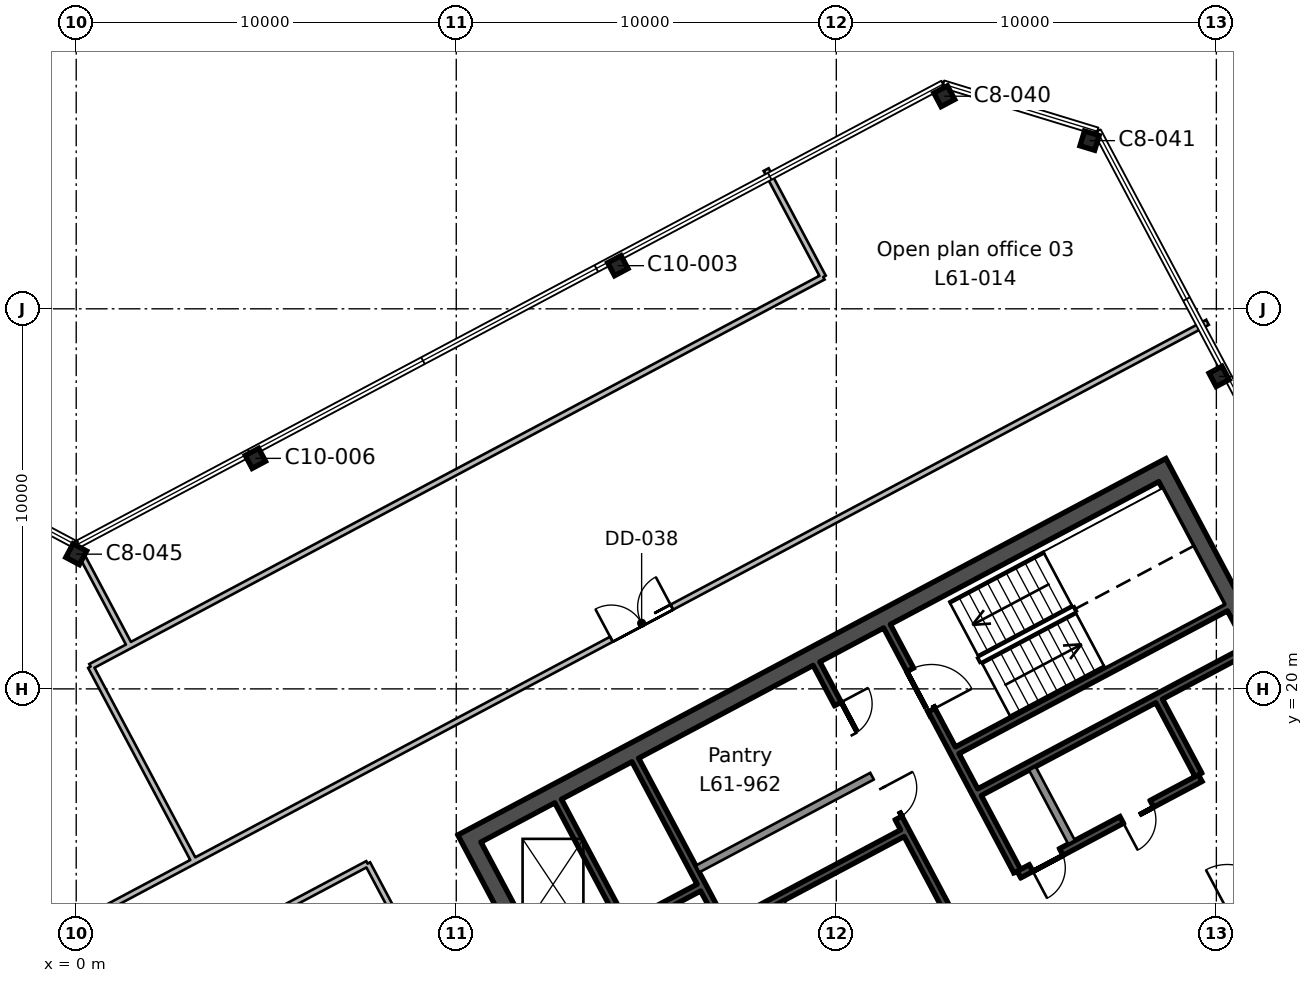
"""IFC4 building model, lengths in metres.
Left out: names, types, materials, properties, quantities, classifications, styles, units other than length and angle.
Written with IfcOpenShell. Run it as: python <this file> out.ifc"""

import sys

from ifc_helpers import new_model, si_unit, direction, frame, frame_2d, origin, origin_2d, place, context, subcontext, project, spatial, rectangle, i_section, extrude, element, fill, save


model = new_model("IFC4")
c1 = context("Model", 3, precision=1e-05, world=origin(), true_north=direction((0.0, 1.0)))
c2 = subcontext(c1, "Body", "Model", "MODEL_VIEW")
j1 = project(units=[si_unit("LENGTHUNIT", "METRE"), si_unit("PLANEANGLEUNIT", "RADIAN")], contexts=[c1])
p1 = place(None, origin())
s1 = spatial("IfcSite", under=j1, at=p1, CompositionType="ELEMENT")
p2 = place(p1, origin())
s2 = spatial("IfcBuilding", under=s1, at=p2, CompositionType="ELEMENT")
p3 = place(p2, frame((0.0, 0.0, 273.6)))
s3 = spatial("IfcBuildingStorey", under=s2, at=p3, CompositionType="ELEMENT", Elevation=273.6)
p4 = place(p3, frame((0.0, 23.544, 0.0), z_axis=(0.0, 0.0, 1.0), x_axis=(-0.882947592859, 0.469471562786, 0.0)))
e1 = element("IfcColumn", 1, at=p4, inside=s3, PredefinedType="COLUMN", context=c2, shape_type="SweptSolid", body=[
    extrude(i_section(OverallWidth=0.404, OverallDepth=0.406, WebThickness=0.027, FlangeThickness=0.044, FilletRadius=0.015, at=origin_2d()), origin(), (0.0, 0.0, 1.0), 3.9),
])
for number, where, z_axis, x_axis in (
    (2, (4.715, 26.065, 0.0), (0.0, 0.0, 1.0), (-0.883, -0.469, 0.0)),
    (3, (30.071, 28.221, 0.0), (0.0, 0.0, 1.0), (-0.469, 0.883, 0.0)),
    (4, (14.251, 31.135, 0.0), (0.0, 0.0, 1.0), (-0.883, -0.469, 0.0)),
):
    element("IfcColumn", number, at=place(p3, frame(where, z_axis=z_axis, x_axis=x_axis)), inside=s3, PredefinedType="COLUMN", context=c2, shape_type="SweptSolid", body=[
        extrude(i_section(OverallWidth=0.399, OverallDepth=0.386, WebThickness=0.021, FlangeThickness=0.033, FilletRadius=0.015, at=origin_2d()), origin(), (0.0, 0.0, 1.0), 3.9),
    ])
for number, where, z_axis, x_axis in (
    (5, (26.664, 34.425, 0.0), (0.0, 0.0, 1.0), (-0.956, 0.292, 0.0)),
    (6, (22.841, 35.594, 0.0), (0.0, 0.0, 1.0), (-0.883, -0.469, 0.0)),
):
    element("IfcColumn", number, at=place(p3, frame(where, z_axis=z_axis, x_axis=x_axis)), inside=s3, PredefinedType="COLUMN", context=c2, shape_type="SweptSolid", body=[
        extrude(i_section(OverallWidth=0.404, OverallDepth=0.406, WebThickness=0.027, FlangeThickness=0.044, FilletRadius=0.015, at=origin_2d()), origin(), (0.0, 0.0, 1.0), 3.9),
    ])
p5 = place(p3, frame((19.207, -0.604, 0.0), z_axis=(0.0, 0.0, 1.0), x_axis=(-0.469467968382, 0.882949504028, 0.0)))
e7 = element("IfcWall", 7, at=p5, inside=s3, PredefinedType="SHEAR", context=c2, shape_type="SweptSolid", body=[
    extrude(rectangle(XDim=19.1, YDim=0.45, at=frame_2d((9.55, 0.0))), origin(), (0.0, 0.0, 1.0), 3.9),
])
p6 = place(p5, frame((6.55, 0.0, 0.0)))
e8 = element("IfcOpeningElement", 8, at=p6, cuts=e7, PredefinedType="OPENING", context=c2, shape_type="SweptSolid", body=[
    extrude(rectangle(XDim=2.4, YDim=2.4, at=frame_2d((1.2, 1.2))), frame((0.0, 0.235, 0.0), z_axis=(0.0, -1.0, 0.0), x_axis=(1.0, 0.0, 0.0)), (0.0, 0.0, 1.0), 0.47),
])
p7 = place(p3, frame((37.439, 9.091, 0.0), z_axis=(0.0, 0.0, 1.0), x_axis=(-0.469467968382, 0.882949504028, 0.0)))
e9 = element("IfcWall", 9, at=p7, inside=s3, PredefinedType="SHEAR", context=c2, shape_type="SweptSolid", body=[
    extrude(rectangle(XDim=19.1, YDim=0.45, at=frame_2d((9.55, 0.0))), origin(), (0.0, 0.0, 1.0), 3.9),
])
p8 = place(p7, frame((10.15, 0.0, 0.0)))
e10 = element("IfcOpeningElement", 10, at=p8, cuts=e9, PredefinedType="OPENING", context=c2, shape_type="SweptSolid", body=[
    extrude(rectangle(XDim=2.4, YDim=2.4, at=frame_2d((1.2, 1.2))), frame((0.0, 0.235, 0.0), z_axis=(0.0, -1.0, 0.0), x_axis=(1.0, 0.0, 0.0)), (0.0, 0.0, 1.0), 0.47),
])
p9 = place(p3, frame((10.544, 16.167, 0.0), z_axis=(0.0, 0.0, 1.0), x_axis=(0.882947755831, 0.46947125628, 0.0)))
e11 = element("IfcWall", 11, at=p9, inside=s3, PredefinedType="SHEAR", context=c2, shape_type="SweptSolid", body=[
    extrude(rectangle(XDim=20.2, YDim=0.45, at=frame_2d((10.1, 0.0))), origin(), (0.0, 0.0, 1.0), 3.9),
])
p10 = place(p3, frame((14.394, 13.826, 0.0), z_axis=(0.0, 0.0, 1.0), x_axis=(-0.469494272526, 0.882935517501, 0.0)))
e12 = element("IfcWall", 12, at=p10, inside=s3, PredefinedType="SHEAR", context=c2, shape_type="SweptSolid", body=[
    extrude(rectangle(XDim=3.65, YDim=0.2, at=frame_2d((1.825, 0.0))), origin(), (0.0, 0.0, 1.0), 3.9),
])
p11 = place(p3, frame((18.138, 11.683, 0.0), z_axis=(0.0, 0.0, 1.0), x_axis=(-0.469480409012, 0.88294288918, 0.0)))
e13 = element("IfcWall", 13, at=p11, inside=s3, PredefinedType="SHEAR", context=c2, shape_type="SweptSolid", body=[
    extrude(rectangle(XDim=7.3, YDim=0.2, at=frame_2d((3.65, 0.0))), origin(), (0.0, 0.0, 1.0), 3.9),
])
p12 = place(p3, frame((19.569, 12.444, 0.0), z_axis=(0.0, 0.0, 1.0), x_axis=(-0.4694473164, 0.882960484464, 0.0)))
e14 = element("IfcWall", 14, at=p12, inside=s3, PredefinedType="SOLIDWALL", context=c2, shape_type="SweptSolid", body=[
    extrude(rectangle(XDim=2.2, YDim=0.2, at=frame_2d((1.1, 0.0))), origin(), (0.0, 0.0, 1.0), 3.9),
])
p13 = place(p3, frame((22.906, 14.218, 0.0), z_axis=(0.0, 0.0, 1.0), x_axis=(-0.469480409012, 0.88294288918, 0.0)))
e15 = element("IfcWall", 15, at=p13, inside=s3, PredefinedType="SHEAR", context=c2, shape_type="SweptSolid", body=[
    extrude(rectangle(XDim=7.3, YDim=0.2, at=frame_2d((3.65, 0.0))), origin(), (0.0, 0.0, 1.0), 3.9),
])
p14 = place(p13, frame((2.7, 0.0, 0.0)))
e16 = element("IfcOpeningElement", 16, at=p14, cuts=e15, PredefinedType="OPENING", context=c2, shape_type="SweptSolid", body=[
    extrude(rectangle(XDim=0.9, YDim=2.1, at=frame_2d((0.45, 1.05))), frame((0.0, 0.11, 0.0), z_axis=(0.0, -1.0, 0.0), x_axis=(1.0, 0.0, 0.0)), (0.0, 0.0, 1.0), 0.22),
])
p15 = place(p13, frame((5.2, 0.0, 0.0)))
e17 = element("IfcOpeningElement", 17, at=p15, cuts=e15, PredefinedType="OPENING", context=c2, shape_type="SweptSolid", body=[
    extrude(rectangle(XDim=0.9, YDim=2.1, at=frame_2d((0.45, 1.05))), frame((0.0, 0.11, 0.0), z_axis=(0.0, -1.0, 0.0), x_axis=(1.0, 0.0, 0.0)), (0.0, 0.0, 1.0), 0.22),
])
p16 = place(p3, frame((24.76, 15.204, 0.0), z_axis=(0.0, 0.0, 1.0), x_axis=(-0.469494272526, 0.882935517501, 0.0)))
e18 = element("IfcWall", 18, at=p16, inside=s3, PredefinedType="SHEAR", context=c2, shape_type="SweptSolid", body=[
    extrude(rectangle(XDim=7.3, YDim=0.2, at=frame_2d((3.65, 0.0))), origin(), (0.0, 0.0, 1.0), 3.9),
])
p17 = place(p16, frame((4.8, 0.0, 0.0)))
e19 = element("IfcOpeningElement", 19, at=p17, cuts=e18, PredefinedType="OPENING", context=c2, shape_type="SweptSolid", body=[
    extrude(rectangle(XDim=1.2, YDim=2.1, at=frame_2d((0.6, 1.05))), frame((0.0, 0.11, 0.0), z_axis=(0.0, -1.0, 0.0), x_axis=(1.0, 0.0, 0.0)), (0.0, 0.0, 1.0), 0.22),
])
p18 = place(p3, frame((26.191, 15.965, 0.0), z_axis=(0.0, 0.0, 1.0), x_axis=(-0.469533832133, 0.882914480843, 0.0)))
e20 = element("IfcWall", 20, at=p18, inside=s3, PredefinedType="SOLIDWALL", context=c2, shape_type="SweptSolid", body=[
    extrude(rectangle(XDim=2.2, YDim=0.2, at=frame_2d((1.1, 0.0))), origin(), (0.0, 0.0, 1.0), 3.9),
])
p19 = place(p3, frame((29.528, 17.739, 0.0), z_axis=(0.0, 0.0, 1.0), x_axis=(-0.469401318492, 0.882984938828, 0.0)))
e21 = element("IfcWall", 21, at=p19, inside=s3, PredefinedType="SHEAR", context=c2, shape_type="SweptSolid", body=[
    extrude(rectangle(XDim=2.2, YDim=0.2, at=frame_2d((1.1, 0.0))), origin(), (0.0, 0.0, 1.0), 3.9),
])
p20 = place(p3, frame((24.726, 11.222, 0.0), z_axis=(0.0, 0.0, 1.0), x_axis=(0.882940221191, 0.469485426614, 0.0)))
e22 = element("IfcWall", 22, at=p20, inside=s3, PredefinedType="SHEAR", context=c2, shape_type="SweptSolid", body=[
    extrude(rectangle(XDim=10.0, YDim=0.2, at=frame_2d((5.0, 0.0))), origin(), (0.0, 0.0, 1.0), 3.9),
])
p21 = place(p20, frame((6.3, 0.0, 0.0)))
e23 = element("IfcOpeningElement", 23, at=p21, cuts=e22, PredefinedType="OPENING", context=c2, shape_type="SweptSolid", body=[
    extrude(rectangle(XDim=1.2, YDim=2.1, at=frame_2d((0.6, 1.05))), frame((0.0, 0.11, 0.0), z_axis=(0.0, -1.0, 0.0), x_axis=(1.0, 0.0, 0.0)), (0.0, 0.0, 1.0), 0.22),
])
p22 = place(p20, frame((0.36, 0.0, 0.0)))
e24 = element("IfcOpeningElement", 24, at=p22, cuts=e22, PredefinedType="OPENING", context=c2, shape_type="SweptSolid", body=[
    extrude(rectangle(XDim=0.9, YDim=2.1, at=frame_2d((0.45, 1.05))), frame((0.0, 0.11, 0.0), z_axis=(0.0, -1.0, 0.0), x_axis=(1.0, 0.0, 0.0)), (0.0, 0.0, 1.0), 0.22),
])
p23 = place(p20, frame((3.06, 0.0, 0.0)))
e25 = element("IfcOpeningElement", 25, at=p23, cuts=e22, PredefinedType="OPENING", context=c2, shape_type="SweptSolid", body=[
    extrude(rectangle(XDim=0.9, YDim=2.1, at=frame_2d((0.45, 1.05))), frame((0.0, 0.11, 0.0), z_axis=(0.0, -1.0, 0.0), x_axis=(1.0, 0.0, 0.0)), (0.0, 0.0, 1.0), 0.22),
])
p24 = place(p3, frame((24.807, 15.116, 0.0), z_axis=(0.0, 0.0, 1.0), x_axis=(0.882942972946, 0.469480251476, 0.0)))
e26 = element("IfcWall", 26, at=p24, inside=s3, PredefinedType="SHEAR", context=c2, shape_type="SweptSolid", body=[
    extrude(rectangle(XDim=5.4, YDim=0.2, at=frame_2d((2.7, 0.0))), origin(), (0.0, 0.0, 1.0), 3.9),
])
p25 = place(p24, frame((0.36, 0.0, 0.0)))
e27 = element("IfcOpeningElement", 27, at=p25, cuts=e26, PredefinedType="OPENING", context=c2, shape_type="SweptSolid", body=[
    extrude(rectangle(XDim=0.9, YDim=2.1, at=frame_2d((0.45, 1.05))), frame((0.0, 0.11, 0.0), z_axis=(0.0, -1.0, 0.0), x_axis=(1.0, 0.0, 0.0)), (0.0, 0.0, 1.0), 0.22),
])
p26 = place(p24, frame((3.06, 0.0, 0.0)))
e28 = element("IfcOpeningElement", 28, at=p26, cuts=e26, PredefinedType="OPENING", context=c2, shape_type="SweptSolid", body=[
    extrude(rectangle(XDim=0.9, YDim=2.1, at=frame_2d((0.45, 1.05))), frame((0.0, 0.11, 0.0), z_axis=(0.0, -1.0, 0.0), x_axis=(1.0, 0.0, 0.0)), (0.0, 0.0, 1.0), 0.22),
])
p27 = place(p3, frame((17.147, 13.761, 0.0), z_axis=(0.0, 0.0, 1.0), x_axis=(0.882964314875, 0.469440111896, 0.0)))
e29 = element("IfcWall", 29, at=p27, inside=s3, PredefinedType="SHEAR", context=c2, shape_type="SweptSolid", body=[
    extrude(rectangle(XDim=5.2, YDim=0.2, at=frame_2d((2.6, 0.0))), origin(), (0.0, 0.0, 1.0), 3.9),
])
p28 = place(p3, frame((23.769, 17.282, 0.0), z_axis=(0.0, 0.0, 1.0), x_axis=(0.882940221191, 0.469485426614, 0.0)))
e30 = element("IfcWall", 30, at=p28, inside=s3, PredefinedType="SHEAR", context=c2, shape_type="SweptSolid", body=[
    extrude(rectangle(XDim=8.0, YDim=0.2, at=frame_2d((4.0, 0.0))), origin(), (0.0, 0.0, 1.0), 3.9),
])
p29 = place(p3, frame((12.41, 12.658, 0.0), z_axis=(0.0, 0.0, 1.0), x_axis=(0.8829484765, 0.469469900894, 0.0)))
e31 = element("IfcWall", 31, at=p29, inside=s3, PredefinedType="SHEAR", context=c2, shape_type="SweptSolid", body=[
    extrude(rectangle(XDim=4.5, YDim=0.2, at=frame_2d((2.25, 0.0))), origin(), (0.0, 0.0, 1.0), 3.9),
])
p30 = place(p29, frame((0.6, 0.0, 0.0)))
e32 = element("IfcOpeningElement", 32, at=p30, cuts=e31, PredefinedType="OPENING", context=c2, shape_type="SweptSolid", body=[
    extrude(rectangle(XDim=1.1, YDim=2.1, at=frame_2d((0.55, 1.05))), frame((0.0, 0.11, 0.0), z_axis=(0.0, -1.0, 0.0), x_axis=(1.0, 0.0, 0.0)), (0.0, 0.0, 1.0), 0.22),
])
p31 = place(p3, frame((23.182, 18.385, 0.0), z_axis=(0.0, 0.0, 1.0), x_axis=(0.88295287151, 0.469461634952, 0.0)))
e33 = element("IfcWall", 33, at=p31, inside=s3, PredefinedType="SHEAR", context=c2, shape_type="SweptSolid", body=[
    extrude(rectangle(XDim=8.0, YDim=0.2, at=frame_2d((4.0, 0.0))), origin(), (0.0, 0.0, 1.0), 3.9),
])
p32 = place(p3, frame((16.349, 15.262, 0.0), z_axis=(0.0, 0.0, 1.0), x_axis=(0.882953967957, 0.469459572775, 0.0)))
e34 = element("IfcWall", 34, at=p32, inside=s3, PredefinedType="SOLIDWALL", context=c2, shape_type="SweptSolid", body=[
    extrude(rectangle(XDim=5.2, YDim=0.2, at=frame_2d((2.6, 0.0))), origin(), (0.0, 0.0, 1.0), 3.9),
])
p33 = place(p3, frame((-48.812, 39.771, 0.0), z_axis=(0.0, 0.0, 1.0), x_axis=(0.882945384259, -0.469475716535, 0.0)))
e35 = element("IfcWall", 35, at=p33, inside=s3, PredefinedType="PARTITIONING", context=c2, shape_type="SweptSolid", body=[
    extrude(rectangle(XDim=55.283, YDim=0.15, at=frame_2d((27.642, 0.0))), origin(), (0.0, 0.0, 1.0), 3.54),
])
p34 = place(p33, frame((33.85, 0.0, 0.0)))
e36 = element("IfcOpeningElement", 36, at=p34, cuts=e35, PredefinedType="OPENING", context=c2, shape_type="SweptSolid", body=[
    extrude(rectangle(XDim=1.8, YDim=2.1, at=frame_2d((0.9, 1.05))), frame((0.0, 0.085, 0.0), z_axis=(0.0, -1.0, 0.0), x_axis=(1.0, 0.0, 0.0)), (0.0, 0.0, 1.0), 0.17),
])
p35 = place(p33, frame((27.15, 0.0, 0.0)))
e37 = element("IfcOpeningElement", 37, at=p35, cuts=e35, PredefinedType="OPENING", context=c2, shape_type="SweptSolid", body=[
    extrude(rectangle(XDim=1.0, YDim=2.1, at=frame_2d((0.5, 1.05))), frame((0.0, 0.085, 0.0), z_axis=(0.0, -1.0, 0.0), x_axis=(1.0, 0.0, 0.0)), (0.0, 0.0, 1.0), 0.17),
])
p36 = place(p33, frame((15.55, 0.0, 0.0)))
e38 = element("IfcOpeningElement", 38, at=p36, cuts=e35, PredefinedType="OPENING", context=c2, shape_type="SweptSolid", body=[
    extrude(rectangle(XDim=1.0, YDim=2.1, at=frame_2d((0.5, 1.05))), frame((0.0, 0.085, 0.0), z_axis=(0.0, -1.0, 0.0), x_axis=(1.0, 0.0, 0.0)), (0.0, 0.0, 1.0), 0.17),
])
p37 = place(p3, frame((0.0, 13.817, 0.0), z_axis=(0.0, 0.0, 1.0), x_axis=(0.882939200239, 0.469487346668, 0.0)))
e39 = element("IfcWall", 39, at=p37, inside=s3, PredefinedType="PARTITIONING", context=c2, shape_type="SweptSolid", body=[
    extrude(rectangle(XDim=33.714, YDim=0.15, at=frame_2d((16.857, 0.0))), origin(), (0.0, 0.0, 1.0), 3.54),
])
p38 = place(p37, frame((15.95, 0.0, 0.0)))
e40 = element("IfcOpeningElement", 40, at=p38, cuts=e39, PredefinedType="OPENING", context=c2, shape_type="SweptSolid", body=[
    extrude(rectangle(XDim=1.8, YDim=2.1, at=frame_2d((0.9, 1.05))), frame((0.0, 0.085, 0.0), z_axis=(0.0, -1.0, 0.0), x_axis=(1.0, 0.0, 0.0)), (0.0, 0.0, 1.0), 0.17),
])
p39 = place(p3, frame((2.451, 16.691, 0.0), z_axis=(0.0, 0.0, 1.0), x_axis=(0.46968306716, -0.88283510149, 0.0)))
e41 = element("IfcWall", 41, at=p39, inside=s3, PredefinedType="PARTITIONING", context=c2, shape_type="SweptSolid", body=[
    extrude(rectangle(XDim=1.386, YDim=0.15, at=frame_2d((0.693, 0.0))), origin(), (0.0, 0.0, 1.0), 3.54),
])
p40 = place(p3, frame((0.179, 23.45, 0.0), z_axis=(0.0, 0.0, 1.0), x_axis=(0.469205161074, -0.883089189619, 0.0)))
e42 = element("IfcWall", 42, at=p40, inside=s3, PredefinedType="PARTITIONING", context=c2, shape_type="SweptSolid", body=[
    extrude(rectangle(XDim=2.621, YDim=0.15, at=frame_2d((1.311, 0.0))), origin(), (0.0, 0.0, 1.0), 3.54),
])
p41 = place(p3, frame((1.405, 21.133, 0.0), z_axis=(0.0, 0.0, 1.0), x_axis=(0.882954791134, 0.469458024549, 0.0)))
e43 = element("IfcWall", 43, at=p41, inside=s3, PredefinedType="PARTITIONING", context=c2, shape_type="SweptSolid", body=[
    extrude(rectangle(XDim=20.67, YDim=0.15, at=frame_2d((10.335, 0.0))), origin(), (0.0, 0.0, 1.0), 3.54),
])
p42 = place(p3, frame((19.656, 30.837, 0.0), z_axis=(0.0, 0.0, 1.0), x_axis=(-0.469289077813, 0.883044597654, 0.0)))
e44 = element("IfcWall", 44, at=p42, inside=s3, PredefinedType="PARTITIONING", context=c2, shape_type="SweptSolid", body=[
    extrude(rectangle(XDim=3.2, YDim=0.15, at=frame_2d((1.6, 0.0))), origin(), (0.0, 0.0, 1.0), 3.54),
])
p43 = place(p3, frame((2.451, 16.691, 0.0), z_axis=(0.0, 0.0, 1.0), x_axis=(-0.469465268903, 0.882950939347, 0.0)))
e45 = element("IfcWall", 45, at=p43, inside=s3, PredefinedType="PARTITIONING", context=c2, shape_type="SweptSolid", body=[
    extrude(rectangle(XDim=4.414, YDim=0.15, at=frame_2d((2.207, 0.0))), origin(), (0.0, 0.0, 1.0), 3.54),
])
p44 = place(p3, frame((1.405, 21.133, 0.0), z_axis=(0.0, 0.0, 1.0), x_axis=(-0.882753784089, -0.469835882704, 0.0)))
e46 = element("IfcWall", 46, at=p44, inside=s3, PredefinedType="PARTITIONING", context=c2, shape_type="SweptSolid", body=[
    extrude(rectangle(XDim=1.162, YDim=0.15, at=frame_2d((0.581, 0.0))), origin(), (0.0, 0.0, 1.0), 3.54),
])
p45 = place(p3, frame((7.667, 15.402, 0.0), z_axis=(0.0, 0.0, 1.0), x_axis=(-0.883005489543, -0.469362658759, 0.0)))
e47 = element("IfcWall", 47, at=p45, inside=s3, PredefinedType="PARTITIONING", context=c2, shape_type="SweptSolid", body=[
    extrude(rectangle(XDim=3.413, YDim=0.15, at=frame_2d((1.707, 0.0))), origin(), (0.0, 0.0, 1.0), 3.54),
])
p46 = place(p3, frame((8.518, 13.8, 0.0), z_axis=(0.0, 0.0, 1.0), x_axis=(-0.469148666032, 0.883119204389, 0.0)))
e48 = element("IfcWall", 48, at=p46, inside=s3, PredefinedType="PARTITIONING", context=c2, shape_type="SweptSolid", body=[
    extrude(rectangle(XDim=1.814, YDim=0.15, at=frame_2d((0.907, 0.0))), origin(), (0.0, 0.0, 1.0), 3.54),
])
p47 = place(p21, origin())
e49 = element("IfcDoor", 49, at=p47, inside=s3, OperationType="SINGLE_SWING_LEFT", PredefinedType="DOOR", context=c2, shape_type="SweptSolid", body=[
    extrude(rectangle(XDim=1.2, YDim=2.1, at=frame_2d((0.6, 1.05))), frame((0.0, 0.025, 0.0), z_axis=(0.0, -1.0, 0.0), x_axis=(1.0, 0.0, 0.0)), (0.0, 0.0, 1.0), 0.05),
])
fill(e23, e49)
p48 = place(p17, frame((1.2, 0.0, 0.0), z_axis=(0.0, 0.0, 1.0), x_axis=(-1.0, 0.0, 0.0)))
e50 = element("IfcDoor", 50, at=p48, inside=s3, OperationType="SINGLE_SWING_RIGHT", PredefinedType="DOOR", context=c2, shape_type="SweptSolid", body=[
    extrude(rectangle(XDim=1.2, YDim=2.1, at=frame_2d((0.6, 1.05))), frame((0.0, 0.025, 0.0), z_axis=(0.0, -1.0, 0.0), x_axis=(1.0, 0.0, 0.0)), (0.0, 0.0, 1.0), 0.05),
])
fill(e19, e50)
p49 = place(p25, frame((0.9, 0.0, 0.0), z_axis=(0.0, 0.0, 1.0), x_axis=(-1.0, 0.0, 0.0)))
e51 = element("IfcDoor", 51, at=p49, inside=s3, OperationType="SINGLE_SWING_RIGHT", PredefinedType="DOOR", context=c2, shape_type="SweptSolid", body=[
    extrude(rectangle(XDim=0.9, YDim=2.1, at=frame_2d((0.45, 1.05))), frame((0.0, 0.025, 0.0), z_axis=(0.0, -1.0, 0.0), x_axis=(1.0, 0.0, 0.0)), (0.0, 0.0, 1.0), 0.05),
])
fill(e27, e51)
p50 = place(p26, frame((0.9, 0.0, 0.0), z_axis=(0.0, 0.0, 1.0), x_axis=(-1.0, 0.0, 0.0)))
e52 = element("IfcDoor", 52, at=p50, inside=s3, OperationType="SINGLE_SWING_RIGHT", PredefinedType="DOOR", context=c2, shape_type="SweptSolid", body=[
    extrude(rectangle(XDim=0.9, YDim=2.1, at=frame_2d((0.45, 1.05))), frame((0.0, 0.025, 0.0), z_axis=(0.0, -1.0, 0.0), x_axis=(1.0, 0.0, 0.0)), (0.0, 0.0, 1.0), 0.05),
])
fill(e28, e52)
p51 = place(p14, frame((0.9, 0.0, 0.0), z_axis=(0.0, 0.0, 1.0), x_axis=(-1.0, 0.0, 0.0)))
e53 = element("IfcDoor", 53, at=p51, inside=s3, OperationType="SINGLE_SWING_LEFT", PredefinedType="DOOR", context=c2, shape_type="SweptSolid", body=[
    extrude(rectangle(XDim=0.9, YDim=2.1, at=frame_2d((0.45, 1.05))), frame((0.0, 0.025, 0.0), z_axis=(0.0, -1.0, 0.0), x_axis=(1.0, 0.0, 0.0)), (0.0, 0.0, 1.0), 0.05),
])
fill(e16, e53)
p52 = place(p15, frame((0.9, 0.0, 0.0), z_axis=(0.0, 0.0, 1.0), x_axis=(-1.0, 0.0, 0.0)))
e54 = element("IfcDoor", 54, at=p52, inside=s3, OperationType="SINGLE_SWING_LEFT", PredefinedType="DOOR", context=c2, shape_type="SweptSolid", body=[
    extrude(rectangle(XDim=0.9, YDim=2.1, at=frame_2d((0.45, 1.05))), frame((0.0, 0.025, 0.0), z_axis=(0.0, -1.0, 0.0), x_axis=(1.0, 0.0, 0.0)), (0.0, 0.0, 1.0), 0.05),
])
fill(e17, e54)
p53 = place(p38, origin())
e55 = element("IfcDoor", 55, at=p53, inside=s3, OperationType="DOUBLE_DOOR_SINGLE_SWING", PredefinedType="DOOR", context=c2, shape_type="SweptSolid", body=[
    extrude(rectangle(XDim=1.8, YDim=2.1, at=frame_2d((0.9, 1.05))), frame((0.0, 0.025, 0.0), z_axis=(0.0, -1.0, 0.0), x_axis=(1.0, 0.0, 0.0)), (0.0, 0.0, 1.0), 0.05),
])
fill(e40, e55)
save(model, sys.argv[1])
